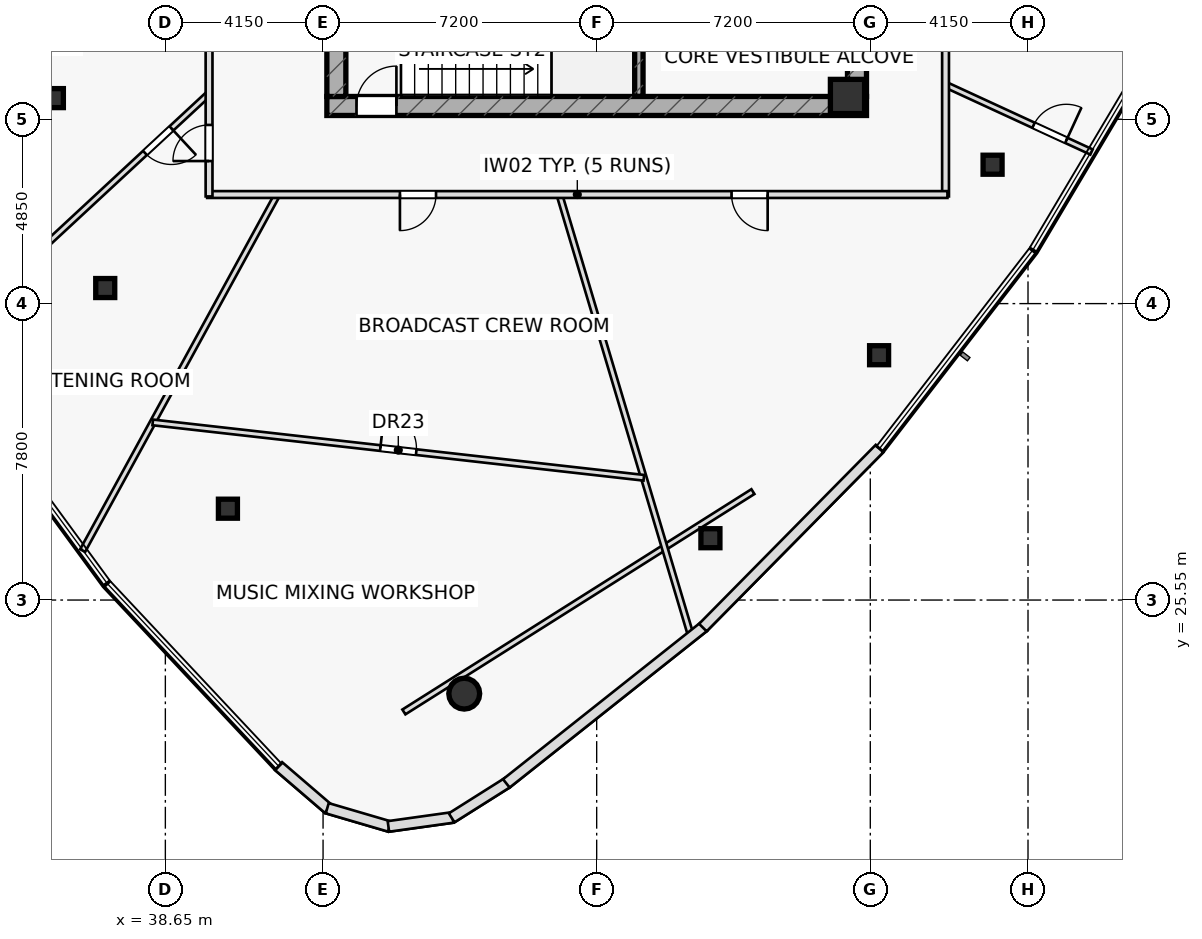
"""IFC4 building model, lengths in metres.
Left out: names, types, materials, properties, quantities, classifications, styles, units other than length and angle.
Written with IfcOpenShell. Run it as: python <this file> out.ifc"""

import sys

from ifc_helpers import new_model, si_unit, direction, frame, frame_2d, origin, origin_2d, place, context, subcontext, project, spatial, rectangle, hollow_rectangle, hollow_circle, extrude, element, fill, save


model = new_model("IFC4")
c1 = context("Model", 3, precision=1e-05, world=origin(), true_north=direction((0.0, 1.0)))
c2 = subcontext(c1, "Body", "Model", "MODEL_VIEW")
j1 = project(units=[si_unit("LENGTHUNIT", "METRE"), si_unit("PLANEANGLEUNIT", "RADIAN")], contexts=[c1])
p1 = place(None, origin())
s1 = spatial("IfcSite", under=j1, at=p1, CompositionType="ELEMENT")
p2 = place(p1, origin())
s2 = spatial("IfcBuilding", under=s1, at=p2, CompositionType="ELEMENT")
p3 = place(p2, frame((0.0, 0.0, 277.5)))
s3 = spatial("IfcBuildingStorey", under=s2, at=p3, CompositionType="ELEMENT", Elevation=277.5)
p4 = place(p3, frame((51.11, 38.8, 0.0), z_axis=(0.0, 0.0, 1.0), x_axis=(0.0, 1.0, 0.0)))
e1 = element("IfcWall", 1, at=p4, inside=s3, PredefinedType="SHEAR", context=c2, shape_type="SweptSolid", body=[
    extrude(rectangle(XDim=3.1, YDim=0.22, at=frame_2d((1.55, 0.0))), origin(), (0.0, 0.0, 1.0), 3.7),
])
p5 = place(p3, frame((42.9, 38.55, 0.0), z_axis=(0.0, 0.0, 1.0), x_axis=(1.0, 0.0, 0.0)))
e2 = element("IfcWall", 2, at=p5, inside=s3, PredefinedType="SHEAR", context=c2, shape_type="SweptSolid", body=[
    extrude(rectangle(XDim=14.2, YDim=0.5, at=frame_2d((7.1, 0.0))), origin(), (0.0, 0.0, 1.0), 3.7),
])
p6 = place(p5, frame((0.78, 0.0, 0.0)))
e3 = element("IfcOpeningElement", 3, at=p6, cuts=e2, PredefinedType="OPENING", context=c2, shape_type="SweptSolid", body=[
    extrude(rectangle(XDim=1.05, YDim=2.2, at=frame_2d((0.525, 1.1))), frame((0.0, 0.26, 0.0), z_axis=(0.0, -1.0, 0.0), x_axis=(1.0, 0.0, 0.0)), (0.0, 0.0, 1.0), 0.52),
])
p7 = place(p3, frame((43.15, 38.8, 0.0), z_axis=(0.0, 0.0, 1.0), x_axis=(0.0, 1.0, 0.0)))
e4 = element("IfcWall", 4, at=p7, inside=s3, PredefinedType="SHEAR", context=c2, shape_type="SweptSolid", body=[
    extrude(rectangle(XDim=12.4, YDim=0.5, at=frame_2d((6.2, 0.0))), origin(), (0.0, 0.0, 1.0), 3.7),
])
p8 = place(p3, frame((56.85, 38.8, 0.0), z_axis=(0.0, 0.0, 1.0), x_axis=(0.0, 1.0, 0.0)))
e5 = element("IfcWall", 5, at=p8, inside=s3, PredefinedType="SHEAR", context=c2, shape_type="SweptSolid", body=[
    extrude(rectangle(XDim=12.4, YDim=0.5, at=frame_2d((6.2, 0.0))), origin(), (0.0, 0.0, 1.0), 3.7),
])
p9 = place(p8, frame((3.85, 0.0, 0.0)))
e6 = element("IfcOpeningElement", 6, at=p9, cuts=e5, PredefinedType="OPENING", context=c2, shape_type="SweptSolid", body=[
    extrude(rectangle(XDim=1.5, YDim=2.2, at=frame_2d((0.75, 1.1))), frame((0.0, 0.26, 0.0), z_axis=(0.0, -1.0, 0.0), x_axis=(1.0, 0.0, 0.0)), (0.0, 0.0, 1.0), 0.52),
])
p10 = place(p3, frame((56.6, 38.8, 0.0), z_axis=(0.0, 0.0, 1.0), x_axis=(1.0, 0.0, 0.0)))
e7 = element("IfcColumn", 7, at=p10, inside=s3, PredefinedType="COLUMN", context=c2, shape_type="SweptSolid", body=[
    extrude(rectangle(XDim=0.9, YDim=0.9, at=origin_2d()), origin(), (0.0, 0.0, 1.0), 3.7),
])
for number, where, z_axis, x_axis in (
    (8, (35.717, 38.757, 0.0), (0.0, 0.0, 1.0), (1.0, 0.0, 0.0)),
    (9, (37.068, 33.76, 0.0), (0.0, 0.0, 1.0), (1.0, 0.0, 0.0)),
    (10, (40.296, 27.954, 0.0), (0.0, 0.0, 1.0), (1.0, 0.0, 0.0)),
):
    element("IfcColumn", number, at=place(p3, frame(where, z_axis=z_axis, x_axis=x_axis)), inside=s3, PredefinedType="COLUMN", context=c2, shape_type="SweptSolid", body=[
        extrude(hollow_rectangle(XDim=0.5, YDim=0.5, WallThickness=0.03, at=origin_2d()), origin(), (0.0, 0.0, 1.0), 3.7),
    ])
p11 = place(p3, frame((46.515, 23.087, 0.0), z_axis=(0.0, 0.0, 1.0), x_axis=(1.0, 0.0, 0.0)))
e11 = element("IfcColumn", 11, at=p11, inside=s3, PredefinedType="COLUMN", context=c2, shape_type="SweptSolid", body=[
    extrude(hollow_circle(Radius=0.406, WallThickness=0.036, at=origin_2d()), origin(), (0.0, 0.0, 1.0), 3.7),
])
for number, where, z_axis, x_axis in (
    (12, (52.993, 27.177, 0.0), (0.0, 0.0, 1.0), (1.0, 0.0, 0.0)),
    (13, (57.431, 31.992, 0.0), (0.0, 0.0, 1.0), (1.0, 0.0, 0.0)),
    (14, (60.417, 37.004, 0.0), (0.0, 0.0, 1.0), (1.0, 0.0, 0.0)),
):
    element("IfcColumn", number, at=place(p3, frame(where, z_axis=z_axis, x_axis=x_axis)), inside=s3, PredefinedType="COLUMN", context=c2, shape_type="SweptSolid", body=[
        extrude(hollow_rectangle(XDim=0.5, YDim=0.5, WallThickness=0.03, at=origin_2d()), origin(), (0.0, 0.0, 1.0), 3.7),
    ])
p12 = place(p3, frame((44.927, 22.605, 0.0), z_axis=(0.0, 0.0, 1.0), x_axis=(0.845624548895, 0.533778158326, 0.0)))
e15 = element("IfcWall", 15, at=p12, inside=s3, PredefinedType="PARTITIONING", context=c2, shape_type="SweptSolid", body=[
    extrude(rectangle(XDim=10.861, YDim=0.15, at=frame_2d((5.431, 0.0))), origin(), (0.0, 0.0, 1.0), 3.175),
])
p13 = place(p3, frame((39.8, 38.878, 0.0), z_axis=(0.0, 0.0, 1.0), x_axis=(-0.733162754584, -0.680053215044, 0.0)))
e16 = element("IfcWall", 16, at=p13, inside=s3, PredefinedType="PARTITIONING", context=c2, shape_type="SweptSolid", body=[
    extrude(rectangle(XDim=9.722, YDim=0.15, at=frame_2d((4.861, 0.0))), origin(), (0.0, 0.0, 1.0), 3.235),
])
p14 = place(p13, frame((1.35, 0.0, 0.0)))
e17 = element("IfcOpeningElement", 17, at=p14, cuts=e16, PredefinedType="OPENING", context=c2, shape_type="SweptSolid", body=[
    extrude(rectangle(XDim=0.95, YDim=2.05, at=frame_2d((0.475, 1.025))), frame((0.0, 0.085, 0.0), z_axis=(0.0, -1.0, 0.0), x_axis=(1.0, 0.0, 0.0)), (0.0, 0.0, 1.0), 0.17),
])
p15 = place(p3, frame((41.598, 36.22, 0.0), z_axis=(0.0, 0.0, 1.0), x_axis=(-0.479861016029, -0.877344519157, 0.0)))
e18 = element("IfcWall", 18, at=p15, inside=s3, PredefinedType="PARTITIONING", context=c2, shape_type="SweptSolid", body=[
    extrude(rectangle(XDim=10.678, YDim=0.15, at=frame_2d((5.339, 0.0))), origin(), (0.0, 0.0, 1.0), 3.235),
])
p16 = place(p3, frame((49.018, 36.22, 0.0), z_axis=(0.0, 0.0, 1.0), x_axis=(0.285749448788, -0.958304363195, 0.0)))
e19 = element("IfcWall", 19, at=p16, inside=s3, PredefinedType="PARTITIONING", context=c2, shape_type="SweptSolid", body=[
    extrude(rectangle(XDim=12.152, YDim=0.15, at=frame_2d((6.076, 0.0))), origin(), (0.0, 0.0, 1.0), 3.235),
])
p17 = place(p3, frame((59.18, 39.11, 0.0), z_axis=(0.0, 0.0, 1.0), x_axis=(0.908177220168, -0.418585877411, 0.0)))
e20 = element("IfcWall", 20, at=p17, inside=s3, PredefinedType="PARTITIONING", context=c2, shape_type="SweptSolid", body=[
    extrude(rectangle(XDim=4.229, YDim=0.15, at=frame_2d((2.115, 0.0))), origin(), (0.0, 0.0, 1.0), 3.235),
])
p18 = place(p17, frame((2.55, 0.0, 0.0)))
e21 = element("IfcOpeningElement", 21, at=p18, cuts=e20, PredefinedType="OPENING", context=c2, shape_type="SweptSolid", body=[
    extrude(rectangle(XDim=0.95, YDim=2.05, at=frame_2d((0.475, 1.025))), frame((0.0, 0.085, 0.0), z_axis=(0.0, -1.0, 0.0), x_axis=(1.0, 0.0, 0.0)), (0.0, 0.0, 1.0), 0.17),
])
p19 = place(p3, frame((38.318, 30.224, 0.0), z_axis=(0.0, 0.0, 1.0), x_axis=(0.993703389401, -0.112042732438, 0.0)))
e22 = element("IfcWall", 22, at=p19, inside=s3, PredefinedType="PARTITIONING", context=c2, shape_type="SweptSolid", body=[
    extrude(rectangle(XDim=13.004, YDim=0.15, at=frame_2d((6.502, 0.0))), origin(), (0.0, 0.0, 1.0), 3.235),
])
p20 = place(p19, frame((6.027, 0.0, 0.0)))
e23 = element("IfcOpeningElement", 23, at=p20, cuts=e22, PredefinedType="OPENING", context=c2, shape_type="SweptSolid", body=[
    extrude(rectangle(XDim=0.95, YDim=2.05, at=frame_2d((0.475, 1.025))), frame((0.0, 0.085, 0.0), z_axis=(0.0, -1.0, 0.0), x_axis=(1.0, 0.0, 0.0)), (0.0, 0.0, 1.0), 0.17),
])
p21 = place(p3, frame((59.18, 41.1, 0.0), z_axis=(0.0, 0.0, 1.0), x_axis=(0.0, -1.0, 0.0)))
e24 = element("IfcWall", 24, at=p21, inside=s3, PredefinedType="PARTITIONING", context=c2, shape_type="SweptSolid", body=[
    extrude(rectangle(XDim=4.93, YDim=0.18, at=frame_2d((2.465, 0.0))), origin(), (0.0, 0.0, 1.0), 3.435),
])
p22 = place(p3, frame((59.23, 36.22, 0.0), z_axis=(0.0, 0.0, 1.0), x_axis=(-1.0, 0.0, 0.0)))
e25 = element("IfcWall", 25, at=p22, inside=s3, PredefinedType="PARTITIONING", context=c2, shape_type="SweptSolid", body=[
    extrude(rectangle(XDim=19.48, YDim=0.18, at=frame_2d((9.74, 0.0))), origin(), (0.0, 0.0, 1.0), 3.175),
])
p23 = place(p22, frame((4.731, 0.0, 0.0)))
e26 = element("IfcOpeningElement", 26, at=p23, cuts=e25, PredefinedType="OPENING", context=c2, shape_type="SweptSolid", body=[
    extrude(rectangle(XDim=0.95, YDim=2.05, at=frame_2d((0.475, 1.025))), frame((0.0, 0.1, 0.0), z_axis=(0.0, -1.0, 0.0), x_axis=(1.0, 0.0, 0.0)), (0.0, 0.0, 1.0), 0.2),
])
p24 = place(p22, frame((13.458, 0.0, 0.0)))
e27 = element("IfcOpeningElement", 27, at=p24, cuts=e25, PredefinedType="OPENING", context=c2, shape_type="SweptSolid", body=[
    extrude(rectangle(XDim=0.95, YDim=2.05, at=frame_2d((0.475, 1.025))), frame((0.0, 0.1, 0.0), z_axis=(0.0, -1.0, 0.0), x_axis=(1.0, 0.0, 0.0)), (0.0, 0.0, 1.0), 0.2),
])
p25 = place(p3, frame((39.8, 36.17, 0.0), z_axis=(0.0, 0.0, 1.0), x_axis=(0.0, 1.0, 0.0)))
e28 = element("IfcWall", 28, at=p25, inside=s3, PredefinedType="PARTITIONING", context=c2, shape_type="SweptSolid", body=[
    extrude(rectangle(XDim=4.08, YDim=0.18, at=frame_2d((2.04, 0.0))), origin(), (0.0, 0.0, 1.0), 3.435),
])
p26 = place(p25, frame((0.931, 0.0, 0.0)))
e29 = element("IfcOpeningElement", 29, at=p26, cuts=e28, PredefinedType="OPENING", context=c2, shape_type="SweptSolid", body=[
    extrude(rectangle(XDim=0.95, YDim=2.05, at=frame_2d((0.475, 1.025))), frame((0.0, 0.1, 0.0), z_axis=(0.0, -1.0, 0.0), x_axis=(1.0, 0.0, 0.0)), (0.0, 0.0, 1.0), 0.2),
])
p27 = place(p3, frame((41.631, 21.178, 0.0), z_axis=(0.0, 0.0, 1.0), x_axis=(0.758735212864, -0.651399168529, 0.0)))
e30 = element("IfcWall", 30, at=p27, inside=s3, PredefinedType="STANDARD", context=c2, shape_type="SweptSolid", body=[
    extrude(rectangle(XDim=1.719, YDim=0.28, at=frame_2d((0.86, 0.0))), origin(), (0.0, 0.0, 1.0), 3.7),
])
p28 = place(p3, frame((42.91, 20.072, 0.0), z_axis=(0.0, 0.0, 1.0), x_axis=(0.959574643945, -0.281454263955, 0.0)))
e31 = element("IfcWall", 31, at=p28, inside=s3, PredefinedType="STANDARD", context=c2, shape_type="SweptSolid", body=[
    extrude(rectangle(XDim=1.708, YDim=0.28, at=frame_2d((0.854, 0.0))), origin(), (0.0, 0.0, 1.0), 3.7),
])
p29 = place(p3, frame((44.52, 19.594, 0.0), z_axis=(0.0, 0.0, 1.0), x_axis=(0.990398979039, 0.138238425625, 0.0)))
e32 = element("IfcWall", 32, at=p29, inside=s3, PredefinedType="STANDARD", context=c2, shape_type="SweptSolid", body=[
    extrude(rectangle(XDim=1.708, YDim=0.28, at=frame_2d((0.854, 0.0))), origin(), (0.0, 0.0, 1.0), 3.7),
])
p30 = place(p3, frame((46.184, 19.82, 0.0), z_axis=(0.0, 0.0, 1.0), x_axis=(0.845723514068, 0.533621343044, 0.0)))
e33 = element("IfcWall", 33, at=p30, inside=s3, PredefinedType="STANDARD", context=c2, shape_type="SweptSolid", body=[
    extrude(rectangle(XDim=1.73, YDim=0.28, at=frame_2d((0.865, 0.0))), origin(), (0.0, 0.0, 1.0), 3.7),
])
p31 = place(p3, frame((47.623, 20.726, 0.0), z_axis=(0.0, 0.0, 1.0), x_axis=(0.783430907522, 0.62147889195, 0.0)))
e34 = element("IfcWall", 34, at=p31, inside=s3, PredefinedType="STANDARD", context=c2, shape_type="SweptSolid", body=[
    extrude(rectangle(XDim=6.63, YDim=0.28, at=frame_2d((3.315, 0.0))), origin(), (0.0, 0.0, 1.0), 3.7),
])
p32 = place(p3, frame((52.794, 24.826, 0.0), z_axis=(0.0, 0.0, 1.0), x_axis=(0.702480356773, 0.711703132175, 0.0)))
e35 = element("IfcWall", 35, at=p32, inside=s3, PredefinedType="STANDARD", context=c2, shape_type="SweptSolid", body=[
    extrude(rectangle(XDim=6.618, YDim=0.28, at=frame_2d((3.309, 0.0))), origin(), (0.0, 0.0, 1.0), 3.7),
])
p33 = place(p6, origin())
e36 = element("IfcDoor", 36, at=p33, inside=s3, OperationType="SINGLE_SWING_RIGHT", PredefinedType="DOOR", context=c2, shape_type="SweptSolid", body=[
    extrude(rectangle(XDim=1.05, YDim=2.2, at=frame_2d((0.525, 1.1))), frame((0.0, 0.025, 0.0), z_axis=(0.0, -1.0, 0.0), x_axis=(1.0, 0.0, 0.0)), (0.0, 0.0, 1.0), 0.05),
])
fill(e3, e36)
p34 = place(p14, origin())
e37 = element("IfcDoor", 37, at=p34, inside=s3, OperationType="SINGLE_SWING_LEFT", PredefinedType="DOOR", context=c2, shape_type="SweptSolid", body=[
    extrude(rectangle(XDim=0.95, YDim=2.05, at=frame_2d((0.475, 1.025))), frame((0.0, 0.025, 0.0), z_axis=(0.0, -1.0, 0.0), x_axis=(1.0, 0.0, 0.0)), (0.0, 0.0, 1.0), 0.05),
])
fill(e17, e37)
p35 = place(p18, origin())
e38 = element("IfcDoor", 38, at=p35, inside=s3, OperationType="SINGLE_SWING_RIGHT", PredefinedType="DOOR", context=c2, shape_type="SweptSolid", body=[
    extrude(rectangle(XDim=0.95, YDim=2.05, at=frame_2d((0.475, 1.025))), frame((0.0, 0.025, 0.0), z_axis=(0.0, -1.0, 0.0), x_axis=(1.0, 0.0, 0.0)), (0.0, 0.0, 1.0), 0.05),
])
fill(e21, e38)
p36 = place(p20, origin())
e39 = element("IfcDoor", 39, at=p36, inside=s3, OperationType="SINGLE_SWING_LEFT", PredefinedType="DOOR", context=c2, shape_type="SweptSolid", body=[
    extrude(rectangle(XDim=0.95, YDim=2.05, at=frame_2d((0.475, 1.025))), frame((0.0, 0.025, 0.0), z_axis=(0.0, -1.0, 0.0), x_axis=(1.0, 0.0, 0.0)), (0.0, 0.0, 1.0), 0.05),
])
fill(e23, e39)
p37 = place(p23, origin())
e40 = element("IfcDoor", 40, at=p37, inside=s3, OperationType="SINGLE_SWING_LEFT", PredefinedType="DOOR", context=c2, shape_type="SweptSolid", body=[
    extrude(rectangle(XDim=0.95, YDim=2.05, at=frame_2d((0.475, 1.025))), frame((0.0, 0.025, 0.0), z_axis=(0.0, -1.0, 0.0), x_axis=(1.0, 0.0, 0.0)), (0.0, 0.0, 1.0), 0.05),
])
fill(e26, e40)
p38 = place(p24, origin())
e41 = element("IfcDoor", 41, at=p38, inside=s3, OperationType="SINGLE_SWING_RIGHT", PredefinedType="DOOR", context=c2, shape_type="SweptSolid", body=[
    extrude(rectangle(XDim=0.95, YDim=2.05, at=frame_2d((0.475, 1.025))), frame((0.0, 0.025, 0.0), z_axis=(0.0, -1.0, 0.0), x_axis=(1.0, 0.0, 0.0)), (0.0, 0.0, 1.0), 0.05),
])
fill(e27, e41)
p39 = place(p26, origin())
e42 = element("IfcDoor", 42, at=p39, inside=s3, OperationType="SINGLE_SWING_LEFT", PredefinedType="DOOR", context=c2, shape_type="SweptSolid", body=[
    extrude(rectangle(XDim=0.95, YDim=2.05, at=frame_2d((0.475, 1.025))), frame((0.0, 0.025, 0.0), z_axis=(0.0, -1.0, 0.0), x_axis=(1.0, 0.0, 0.0)), (0.0, 0.0, 1.0), 0.05),
])
fill(e29, e42)
save(model, sys.argv[1])
